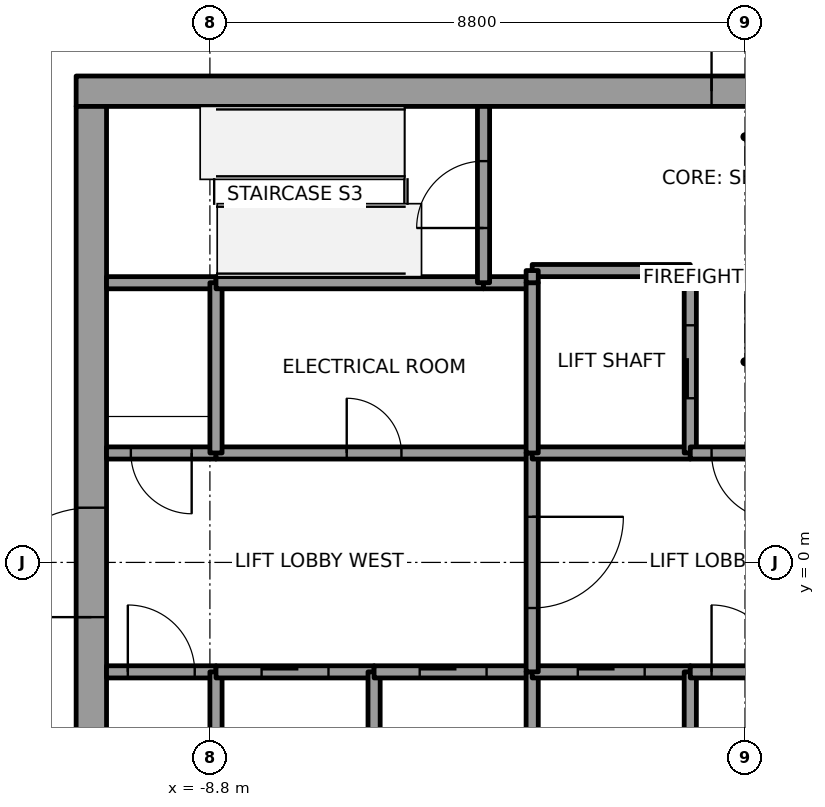
"""IFC4 building model, lengths in metres.
Left out: names, types, materials, properties, quantities, classifications, styles, units other than length and angle.
Written with IfcOpenShell. Run it as: python <this file> out.ifc"""

import sys

from ifc_helpers import new_model, si_unit, direction, frame, frame_2d, origin, place, context, subcontext, project, spatial, rectangle, extrude, element, fill, save


model = new_model("IFC4")
c1 = context("Model", 3, precision=1e-05, world=origin(), true_north=direction((0.0, 1.0)))
c2 = subcontext(c1, "Body", "Model", "MODEL_VIEW")
j1 = project(units=[si_unit("LENGTHUNIT", "METRE"), si_unit("PLANEANGLEUNIT", "RADIAN")], contexts=[c1])
p1 = place(None, origin())
s1 = spatial("IfcSite", under=j1, at=p1, CompositionType="ELEMENT")
p2 = place(p1, origin())
s2 = spatial("IfcBuilding", under=s1, at=p2, CompositionType="ELEMENT")
p3 = place(p2, frame((0.0, 0.0, 299.0)))
s3 = spatial("IfcBuildingStorey", under=s2, at=p3, CompositionType="ELEMENT", Elevation=299.0)
p4 = place(p3, frame((-11.0, 7.75, 0.0), z_axis=(0.0, 0.0, 1.0), x_axis=(1.0, 0.0, 0.0)))
e1 = element("IfcWall", 1, at=p4, inside=s3, PredefinedType="SHEAR", context=c2, shape_type="SweptSolid", body=[
    extrude(rectangle(XDim=22.0, YDim=0.5, at=frame_2d((11.0, 0.0))), origin(), (0.0, 0.0, 1.0), 4.0),
])
p5 = place(p4, frame((10.45, 0.0, 0.0)))
e2 = element("IfcOpeningElement", 2, at=p5, cuts=e1, PredefinedType="OPENING", context=c2, shape_type="SweptSolid", body=[
    extrude(rectangle(XDim=1.1, YDim=2.1, at=frame_2d((0.55, 1.05))), frame((0.0, 0.25, 0.0), z_axis=(0.0, -1.0, 0.0), x_axis=(1.0, 0.0, 0.0)), (0.0, 0.0, 1.0), 0.5),
])
p6 = place(p3, frame((-10.75, -7.5, 0.0), z_axis=(0.0, 0.0, 1.0), x_axis=(0.0, 1.0, 0.0)))
e3 = element("IfcWall", 3, at=p6, inside=s3, PredefinedType="SHEAR", context=c2, shape_type="SweptSolid", body=[
    extrude(rectangle(XDim=15.0, YDim=0.5, at=frame_2d((7.5, 0.0))), origin(), (0.0, 0.0, 1.0), 4.0),
])
p7 = place(p6, frame((6.6, 0.0, 0.0)))
e4 = element("IfcOpeningElement", 4, at=p7, cuts=e3, PredefinedType="OPENING", context=c2, shape_type="SweptSolid", body=[
    extrude(rectangle(XDim=1.8, YDim=2.1, at=frame_2d((0.9, 1.05))), frame((0.0, 0.25, 0.0), z_axis=(0.0, -1.0, 0.0), x_axis=(1.0, 0.0, 0.0)), (0.0, 0.0, 1.0), 0.5),
])
p8 = place(p3, frame((-10.5, -1.8, 0.0), z_axis=(0.0, 0.0, 1.0), x_axis=(1.0, 0.0, 0.0)))
e5 = element("IfcWall", 5, at=p8, inside=s3, PredefinedType="SOLIDWALL", context=c2, shape_type="SweptSolid", body=[
    extrude(rectangle(XDim=1.8, YDim=0.2, at=frame_2d((0.9, 0.0))), origin(), (0.0, 0.0, 1.0), 3.85),
])
p9 = place(p8, frame((0.35, 0.0, 0.0)))
e6 = element("IfcOpeningElement", 6, at=p9, cuts=e5, PredefinedType="OPENING", context=c2, shape_type="SweptSolid", body=[
    extrude(rectangle(XDim=1.1, YDim=2.1, at=frame_2d((0.55, 1.05))), frame((0.0, 0.1, 0.0), z_axis=(0.0, -1.0, 0.0), x_axis=(1.0, 0.0, 0.0)), (0.0, 0.0, 1.0), 0.2),
])
p10 = place(p3, frame((-8.7, 1.8, 0.0), z_axis=(0.0, 0.0, 1.0), x_axis=(-1.0, 0.0, 0.0)))
e7 = element("IfcWall", 7, at=p10, inside=s3, PredefinedType="SOLIDWALL", context=c2, shape_type="SweptSolid", body=[
    extrude(rectangle(XDim=1.8, YDim=0.2, at=frame_2d((0.9, 0.0))), origin(), (0.0, 0.0, 1.0), 3.85),
])
p11 = place(p10, frame((0.4, 0.0, 0.0)))
e8 = element("IfcOpeningElement", 8, at=p11, cuts=e7, PredefinedType="OPENING", context=c2, shape_type="SweptSolid", body=[
    extrude(rectangle(XDim=1.0, YDim=2.1, at=frame_2d((0.5, 1.05))), frame((0.0, 0.1, 0.0), z_axis=(0.0, -1.0, 0.0), x_axis=(1.0, 0.0, 0.0)), (0.0, 0.0, 1.0), 0.2),
])
p12 = place(p3, frame((-8.7, 4.6, 0.0), z_axis=(0.0, 0.0, 1.0), x_axis=(-1.0, 0.0, 0.0)))
e9 = element("IfcWall", 9, at=p12, inside=s3, PredefinedType="SOLIDWALL", context=c2, shape_type="SweptSolid", body=[
    extrude(rectangle(XDim=1.8, YDim=0.2, at=frame_2d((0.9, 0.0))), origin(), (0.0, 0.0, 1.0), 3.85),
])
p13 = place(p3, frame((-8.7, -4.6, 0.0), z_axis=(0.0, 0.0, 1.0), x_axis=(0.0, 1.0, 0.0)))
e10 = element("IfcWall", 10, at=p13, inside=s3, PredefinedType="SOLIDWALL", context=c2, shape_type="SweptSolid", body=[
    extrude(rectangle(XDim=2.8, YDim=0.2, at=frame_2d((1.4, 0.0))), origin(), (0.0, 0.0, 1.0), 3.85),
])
p14 = place(p3, frame((-8.7, -1.8, 0.0), z_axis=(0.0, 0.0, 1.0), x_axis=(1.0, 0.0, 0.0)))
e11 = element("IfcWall", 11, at=p14, inside=s3, PredefinedType="SOLIDWALL", context=c2, shape_type="SweptSolid", body=[
    extrude(rectangle(XDim=2.6, YDim=0.2, at=frame_2d((1.3, 0.0))), origin(), (0.0, 0.0, 1.0), 3.85),
])
p15 = place(p14, frame((0.75, 0.0, 0.0)))
e12 = element("IfcOpeningElement", 12, at=p15, cuts=e11, PredefinedType="OPENING", context=c2, shape_type="SweptSolid", body=[
    extrude(rectangle(XDim=1.1, YDim=2.1, at=frame_2d((0.55, 1.05))), frame((0.0, 0.1, 0.0), z_axis=(0.0, -1.0, 0.0), x_axis=(1.0, 0.0, 0.0)), (0.0, 0.0, 1.0), 0.2),
])
p16 = place(p3, frame((-8.7, 1.8, 0.0), z_axis=(0.0, 0.0, 1.0), x_axis=(1.0, 0.0, 0.0)))
e13 = element("IfcWall", 13, at=p16, inside=s3, PredefinedType="SOLIDWALL", context=c2, shape_type="SweptSolid", body=[
    extrude(rectangle(XDim=5.2, YDim=0.2, at=frame_2d((2.6, 0.0))), origin(), (0.0, 0.0, 1.0), 3.85),
])
p17 = place(p16, frame((2.15, 0.0, 0.0)))
e14 = element("IfcOpeningElement", 14, at=p17, cuts=e13, PredefinedType="OPENING", context=c2, shape_type="SweptSolid", body=[
    extrude(rectangle(XDim=0.9, YDim=2.1, at=frame_2d((0.45, 1.05))), frame((0.0, 0.1, 0.0), z_axis=(0.0, -1.0, 0.0), x_axis=(1.0, 0.0, 0.0)), (0.0, 0.0, 1.0), 0.2),
])
p18 = place(p3, frame((-8.7, 4.6, 0.0), z_axis=(0.0, 0.0, 1.0), x_axis=(0.0, -1.0, 0.0)))
e15 = element("IfcWall", 15, at=p18, inside=s3, PredefinedType="SOLIDWALL", context=c2, shape_type="SweptSolid", body=[
    extrude(rectangle(XDim=2.8, YDim=0.2, at=frame_2d((1.4, 0.0))), origin(), (0.0, 0.0, 1.0), 3.85),
])
p19 = place(p3, frame((-4.3, 4.6, 0.0), z_axis=(0.0, 0.0, 1.0), x_axis=(-1.0, 0.0, 0.0)))
e16 = element("IfcWall", 16, at=p19, inside=s3, PredefinedType="SOLIDWALL", context=c2, shape_type="SweptSolid", body=[
    extrude(rectangle(XDim=4.4, YDim=0.2, at=frame_2d((2.2, 0.0))), origin(), (0.0, 0.0, 1.0), 3.85),
])
p20 = place(p3, frame((-6.1, -4.6, 0.0), z_axis=(0.0, 0.0, 1.0), x_axis=(0.0, 1.0, 0.0)))
e17 = element("IfcWall", 17, at=p20, inside=s3, PredefinedType="SOLIDWALL", context=c2, shape_type="SweptSolid", body=[
    extrude(rectangle(XDim=2.8, YDim=0.2, at=frame_2d((1.4, 0.0))), origin(), (0.0, 0.0, 1.0), 3.85),
])
p21 = place(p3, frame((-6.1, -1.8, 0.0), z_axis=(0.0, 0.0, 1.0), x_axis=(1.0, 0.0, 0.0)))
e18 = element("IfcWall", 18, at=p21, inside=s3, PredefinedType="SOLIDWALL", context=c2, shape_type="SweptSolid", body=[
    extrude(rectangle(XDim=2.6, YDim=0.2, at=frame_2d((1.3, 0.0))), origin(), (0.0, 0.0, 1.0), 3.85),
])
p22 = place(p21, frame((0.75, 0.0, 0.0)))
e19 = element("IfcOpeningElement", 19, at=p22, cuts=e18, PredefinedType="OPENING", context=c2, shape_type="SweptSolid", body=[
    extrude(rectangle(XDim=1.1, YDim=2.1, at=frame_2d((0.55, 1.05))), frame((0.0, 0.1, 0.0), z_axis=(0.0, -1.0, 0.0), x_axis=(1.0, 0.0, 0.0)), (0.0, 0.0, 1.0), 0.2),
])
p23 = place(p3, frame((-3.5, 4.6, 0.0), z_axis=(0.0, 0.0, 1.0), x_axis=(-1.0, 0.0, 0.0)))
e20 = element("IfcWall", 20, at=p23, inside=s3, PredefinedType="SOLIDWALL", context=c2, shape_type="SweptSolid", body=[
    extrude(rectangle(XDim=0.8, YDim=0.2, at=frame_2d((0.4, 0.0))), origin(), (0.0, 0.0, 1.0), 3.85),
])
p24 = place(p3, frame((-4.3, 4.6, 0.0), z_axis=(0.0, 0.0, 1.0), x_axis=(0.0, 1.0, 0.0)))
e21 = element("IfcWall", 21, at=p24, inside=s3, PredefinedType="SOLIDWALL", context=c2, shape_type="SweptSolid", body=[
    extrude(rectangle(XDim=2.9, YDim=0.2, at=frame_2d((1.45, 0.0))), origin(), (0.0, 0.0, 1.0), 3.85),
])
p25 = place(p24, frame((0.9, 0.0, 0.0)))
e22 = element("IfcOpeningElement", 22, at=p25, cuts=e21, PredefinedType="OPENING", context=c2, shape_type="SweptSolid", body=[
    extrude(rectangle(XDim=1.1, YDim=2.1, at=frame_2d((0.55, 1.05))), frame((0.0, 0.1, 0.0), z_axis=(0.0, -1.0, 0.0), x_axis=(1.0, 0.0, 0.0)), (0.0, 0.0, 1.0), 0.2),
])
p26 = place(p3, frame((-3.5, -4.6, 0.0), z_axis=(0.0, 0.0, 1.0), x_axis=(0.0, 1.0, 0.0)))
e23 = element("IfcWall", 23, at=p26, inside=s3, PredefinedType="SOLIDWALL", context=c2, shape_type="SweptSolid", body=[
    extrude(rectangle(XDim=2.8, YDim=0.2, at=frame_2d((1.4, 0.0))), origin(), (0.0, 0.0, 1.0), 3.85),
])
p27 = place(p3, frame((-3.5, -1.8, 0.0), z_axis=(0.0, 0.0, 1.0), x_axis=(1.0, 0.0, 0.0)))
e24 = element("IfcWall", 24, at=p27, inside=s3, PredefinedType="SOLIDWALL", context=c2, shape_type="SweptSolid", body=[
    extrude(rectangle(XDim=2.6, YDim=0.2, at=frame_2d((1.3, 0.0))), origin(), (0.0, 0.0, 1.0), 3.85),
])
p28 = place(p27, frame((0.75, 0.0, 0.0)))
e25 = element("IfcOpeningElement", 25, at=p28, cuts=e24, PredefinedType="OPENING", context=c2, shape_type="SweptSolid", body=[
    extrude(rectangle(XDim=1.1, YDim=2.1, at=frame_2d((0.55, 1.05))), frame((0.0, 0.1, 0.0), z_axis=(0.0, -1.0, 0.0), x_axis=(1.0, 0.0, 0.0)), (0.0, 0.0, 1.0), 0.2),
])
p29 = place(p3, frame((-3.5, 1.8, 0.0), z_axis=(0.0, 0.0, 1.0), x_axis=(0.0, -1.0, 0.0)))
e26 = element("IfcWall", 26, at=p29, inside=s3, PredefinedType="SOLIDWALL", context=c2, shape_type="SweptSolid", body=[
    extrude(rectangle(XDim=3.6, YDim=0.2, at=frame_2d((1.8, 0.0))), origin(), (0.0, 0.0, 1.0), 3.85),
])
p30 = place(p29, frame((1.05, 0.0, 0.0)))
e27 = element("IfcOpeningElement", 27, at=p30, cuts=e26, PredefinedType="OPENING", context=c2, shape_type="SweptSolid", body=[
    extrude(rectangle(XDim=1.5, YDim=2.1, at=frame_2d((0.75, 1.05))), frame((0.0, 0.1, 0.0), z_axis=(0.0, -1.0, 0.0), x_axis=(1.0, 0.0, 0.0)), (0.0, 0.0, 1.0), 0.2),
])
p31 = place(p3, frame((-0.9, 1.8, 0.0), z_axis=(0.0, 0.0, 1.0), x_axis=(-1.0, 0.0, 0.0)))
e28 = element("IfcWall", 28, at=p31, inside=s3, PredefinedType="SOLIDWALL", context=c2, shape_type="SweptSolid", body=[
    extrude(rectangle(XDim=2.6, YDim=0.2, at=frame_2d((1.3, 0.0))), origin(), (0.0, 0.0, 1.0), 3.85),
])
p32 = place(p3, frame((-3.5, 1.8, 0.0), z_axis=(0.0, 0.0, 1.0), x_axis=(0.0, 1.0, 0.0)))
e29 = element("IfcWall", 29, at=p32, inside=s3, PredefinedType="SOLIDWALL", context=c2, shape_type="SweptSolid", body=[
    extrude(rectangle(XDim=2.8, YDim=0.2, at=frame_2d((1.4, 0.0))), origin(), (0.0, 0.0, 1.0), 3.85),
])
p33 = place(p3, frame((-0.9, 1.8, 0.0), z_axis=(0.0, 0.0, 1.0), x_axis=(0.0, 1.0, 0.0)))
e30 = element("IfcWall", 30, at=p33, inside=s3, PredefinedType="SOLIDWALL", context=c2, shape_type="SweptSolid", body=[
    extrude(rectangle(XDim=3.0, YDim=0.2, at=frame_2d((1.5, 0.0))), origin(), (0.0, 0.0, 1.0), 3.85),
])
p34 = place(p33, frame((0.9, 0.0, 0.0)))
e31 = element("IfcOpeningElement", 31, at=p34, cuts=e30, PredefinedType="OPENING", context=c2, shape_type="SweptSolid", body=[
    extrude(rectangle(XDim=1.2, YDim=2.1, at=frame_2d((0.6, 1.05))), frame((0.0, 0.1, 0.0), z_axis=(0.0, -1.0, 0.0), x_axis=(1.0, 0.0, 0.0)), (0.0, 0.0, 1.0), 0.2),
])
p35 = place(p3, frame((-0.9, 4.8, 0.0), z_axis=(0.0, 0.0, 1.0), x_axis=(-1.0, 0.0, 0.0)))
e32 = element("IfcWall", 32, at=p35, inside=s3, PredefinedType="SOLIDWALL", context=c2, shape_type="SweptSolid", body=[
    extrude(rectangle(XDim=2.6, YDim=0.2, at=frame_2d((1.3, 0.0))), origin(), (0.0, 0.0, 1.0), 3.85),
])
p36 = place(p3, frame((-3.5, 4.8, 0.0), z_axis=(0.0, 0.0, 1.0), x_axis=(0.0, -1.0, 0.0)))
e33 = element("IfcWall", 33, at=p36, inside=s3, PredefinedType="SOLIDWALL", context=c2, shape_type="SweptSolid", body=[
    extrude(rectangle(XDim=0.2, YDim=0.2, at=frame_2d((0.1, 0.0))), origin(), (0.0, 0.0, 1.0), 3.85),
])
p37 = place(p3, frame((-0.9, -4.6, 0.0), z_axis=(0.0, 0.0, 1.0), x_axis=(0.0, 1.0, 0.0)))
e34 = element("IfcWall", 34, at=p37, inside=s3, PredefinedType="SOLIDWALL", context=c2, shape_type="SweptSolid", body=[
    extrude(rectangle(XDim=2.8, YDim=0.2, at=frame_2d((1.4, 0.0))), origin(), (0.0, 0.0, 1.0), 3.85),
])
p38 = place(p3, frame((-0.9, -1.8, 0.0), z_axis=(0.0, 0.0, 1.0), x_axis=(1.0, 0.0, 0.0)))
e35 = element("IfcWall", 35, at=p38, inside=s3, PredefinedType="SOLIDWALL", context=c2, shape_type="SweptSolid", body=[
    extrude(rectangle(XDim=1.8, YDim=0.2, at=frame_2d((0.9, 0.0))), origin(), (0.0, 0.0, 1.0), 3.85),
])
p39 = place(p38, frame((0.35, 0.0, 0.0)))
e36 = element("IfcOpeningElement", 36, at=p39, cuts=e35, PredefinedType="OPENING", context=c2, shape_type="SweptSolid", body=[
    extrude(rectangle(XDim=1.1, YDim=2.1, at=frame_2d((0.55, 1.05))), frame((0.0, 0.1, 0.0), z_axis=(0.0, -1.0, 0.0), x_axis=(1.0, 0.0, 0.0)), (0.0, 0.0, 1.0), 0.2),
])
p40 = place(p3, frame((0.9, 1.8, 0.0), z_axis=(0.0, 0.0, 1.0), x_axis=(-1.0, 0.0, 0.0)))
e37 = element("IfcWall", 37, at=p40, inside=s3, PredefinedType="SOLIDWALL", context=c2, shape_type="SweptSolid", body=[
    extrude(rectangle(XDim=1.8, YDim=0.2, at=frame_2d((0.9, 0.0))), origin(), (0.0, 0.0, 1.0), 3.85),
])
p41 = place(p40, frame((0.35, 0.0, 0.0)))
e38 = element("IfcOpeningElement", 38, at=p41, cuts=e37, PredefinedType="OPENING", context=c2, shape_type="SweptSolid", body=[
    extrude(rectangle(XDim=1.1, YDim=2.1, at=frame_2d((0.55, 1.05))), frame((0.0, 0.1, 0.0), z_axis=(0.0, -1.0, 0.0), x_axis=(1.0, 0.0, 0.0)), (0.0, 0.0, 1.0), 0.2),
])
p42 = place(p15, origin())
e39 = element("IfcDoor", 39, at=p42, inside=s3, OperationType="SLIDING_TO_LEFT", PredefinedType="DOOR", context=c2, shape_type="SweptSolid", body=[
    extrude(rectangle(XDim=1.1, YDim=2.1, at=frame_2d((0.55, 1.05))), frame((0.0, 0.025, 0.0), z_axis=(0.0, -1.0, 0.0), x_axis=(1.0, 0.0, 0.0)), (0.0, 0.0, 1.0), 0.05),
])
fill(e12, e39)
p43 = place(p22, origin())
e40 = element("IfcDoor", 40, at=p43, inside=s3, OperationType="SLIDING_TO_RIGHT", PredefinedType="DOOR", context=c2, shape_type="SweptSolid", body=[
    extrude(rectangle(XDim=1.1, YDim=2.1, at=frame_2d((0.55, 1.05))), frame((0.0, 0.025, 0.0), z_axis=(0.0, -1.0, 0.0), x_axis=(1.0, 0.0, 0.0)), (0.0, 0.0, 1.0), 0.05),
])
fill(e19, e40)
p44 = place(p28, origin())
e41 = element("IfcDoor", 41, at=p44, inside=s3, OperationType="SLIDING_TO_LEFT", PredefinedType="DOOR", context=c2, shape_type="SweptSolid", body=[
    extrude(rectangle(XDim=1.1, YDim=2.1, at=frame_2d((0.55, 1.05))), frame((0.0, 0.025, 0.0), z_axis=(0.0, -1.0, 0.0), x_axis=(1.0, 0.0, 0.0)), (0.0, 0.0, 1.0), 0.05),
])
fill(e25, e41)
p45 = place(p34, origin())
e42 = element("IfcDoor", 42, at=p45, inside=s3, OperationType="SLIDING_TO_LEFT", PredefinedType="DOOR", context=c2, shape_type="SweptSolid", body=[
    extrude(rectangle(XDim=1.2, YDim=2.1, at=frame_2d((0.6, 1.05))), frame((0.0, 0.025, 0.0), z_axis=(0.0, -1.0, 0.0), x_axis=(1.0, 0.0, 0.0)), (0.0, 0.0, 1.0), 0.05),
])
fill(e31, e42)
p46 = place(p30, origin())
e43 = element("IfcDoor", 43, at=p46, inside=s3, OperationType="DOUBLE_DOOR_SINGLE_SWING", PredefinedType="DOOR", context=c2, shape_type="SweptSolid", body=[
    extrude(rectangle(XDim=1.5, YDim=2.1, at=frame_2d((0.75, 1.05))), frame((0.0, 0.025, 0.0), z_axis=(0.0, -1.0, 0.0), x_axis=(1.0, 0.0, 0.0)), (0.0, 0.0, 1.0), 0.05),
])
fill(e27, e43)
p47 = place(p9, origin())
e44 = element("IfcDoor", 44, at=p47, inside=s3, OperationType="SINGLE_SWING_RIGHT", PredefinedType="DOOR", context=c2, shape_type="SweptSolid", body=[
    extrude(rectangle(XDim=1.1, YDim=2.1, at=frame_2d((0.55, 1.05))), frame((0.0, 0.025, 0.0), z_axis=(0.0, -1.0, 0.0), x_axis=(1.0, 0.0, 0.0)), (0.0, 0.0, 1.0), 0.05),
])
fill(e6, e44)
p48 = place(p41, origin())
e45 = element("IfcDoor", 45, at=p48, inside=s3, OperationType="SINGLE_SWING_RIGHT", PredefinedType="DOOR", context=c2, shape_type="SweptSolid", body=[
    extrude(rectangle(XDim=1.1, YDim=2.1, at=frame_2d((0.55, 1.05))), frame((0.0, 0.025, 0.0), z_axis=(0.0, -1.0, 0.0), x_axis=(1.0, 0.0, 0.0)), (0.0, 0.0, 1.0), 0.05),
])
fill(e38, e45)
p49 = place(p39, origin())
e46 = element("IfcDoor", 46, at=p49, inside=s3, OperationType="SINGLE_SWING_LEFT", PredefinedType="DOOR", context=c2, shape_type="SweptSolid", body=[
    extrude(rectangle(XDim=1.1, YDim=2.1, at=frame_2d((0.55, 1.05))), frame((0.0, 0.025, 0.0), z_axis=(0.0, -1.0, 0.0), x_axis=(1.0, 0.0, 0.0)), (0.0, 0.0, 1.0), 0.05),
])
fill(e36, e46)
p50 = place(p11, origin())
e47 = element("IfcDoor", 47, at=p50, inside=s3, OperationType="SINGLE_SWING_LEFT", PredefinedType="DOOR", context=c2, shape_type="SweptSolid", body=[
    extrude(rectangle(XDim=1.0, YDim=2.1, at=frame_2d((0.5, 1.05))), frame((0.0, 0.025, 0.0), z_axis=(0.0, -1.0, 0.0), x_axis=(1.0, 0.0, 0.0)), (0.0, 0.0, 1.0), 0.05),
])
fill(e8, e47)
p51 = place(p25, origin())
e48 = element("IfcDoor", 48, at=p51, inside=s3, OperationType="SINGLE_SWING_LEFT", PredefinedType="DOOR", context=c2, shape_type="SweptSolid", body=[
    extrude(rectangle(XDim=1.1, YDim=2.1, at=frame_2d((0.55, 1.05))), frame((0.0, 0.025, 0.0), z_axis=(0.0, -1.0, 0.0), x_axis=(1.0, 0.0, 0.0)), (0.0, 0.0, 1.0), 0.05),
])
fill(e22, e48)
p52 = place(p17, origin())
e49 = element("IfcDoor", 49, at=p52, inside=s3, OperationType="SINGLE_SWING_LEFT", PredefinedType="DOOR", context=c2, shape_type="SweptSolid", body=[
    extrude(rectangle(XDim=0.9, YDim=2.1, at=frame_2d((0.45, 1.05))), frame((0.0, 0.025, 0.0), z_axis=(0.0, -1.0, 0.0), x_axis=(1.0, 0.0, 0.0)), (0.0, 0.0, 1.0), 0.05),
])
fill(e14, e49)
p53 = place(p7, origin())
e50 = element("IfcDoor", 50, at=p53, inside=s3, OperationType="DOUBLE_DOOR_SINGLE_SWING", PredefinedType="DOOR", context=c2, shape_type="SweptSolid", body=[
    extrude(rectangle(XDim=1.8, YDim=2.1, at=frame_2d((0.9, 1.05))), frame((0.0, 0.025, 0.0), z_axis=(0.0, -1.0, 0.0), x_axis=(1.0, 0.0, 0.0)), (0.0, 0.0, 1.0), 0.05),
])
fill(e4, e50)
p54 = place(p5, origin())
e51 = element("IfcDoor", 51, at=p54, inside=s3, OperationType="SINGLE_SWING_LEFT", PredefinedType="DOOR", context=c2, shape_type="SweptSolid", body=[
    extrude(rectangle(XDim=1.1, YDim=2.1, at=frame_2d((0.55, 1.05))), frame((0.0, 0.025, 0.0), z_axis=(0.0, -1.0, 0.0), x_axis=(1.0, 0.0, 0.0)), (0.0, 0.0, 1.0), 0.05),
])
fill(e2, e51)
save(model, sys.argv[1])
